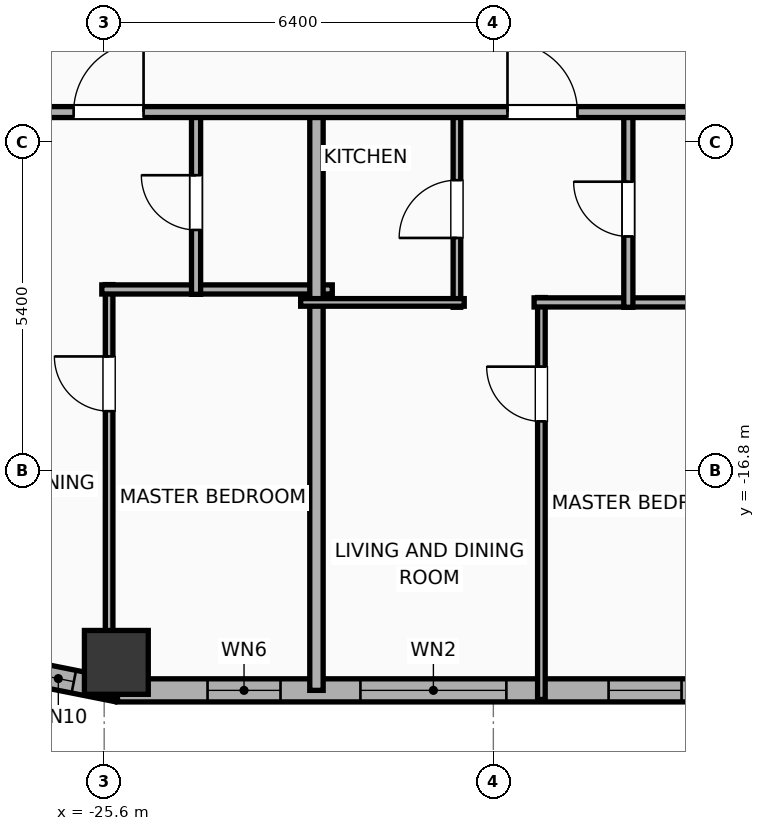
"""IFC4 building model, lengths in metres.
Left out: names, types, materials, properties, quantities, classifications, styles, units other than length and angle.
Written with IfcOpenShell. Run it as: python <this file> out.ifc"""

import sys

from ifc_helpers import new_model, si_unit, direction, frame, frame_2d, origin, origin_2d, place, context, subcontext, project, spatial, rectangle, hollow_rectangle, extrude, element, fill, save


model = new_model("IFC4")
c1 = context("Model", 3, precision=1e-05, world=origin(), true_north=direction((0.0, 1.0)))
c2 = subcontext(c1, "Body", "Model", "MODEL_VIEW")
j1 = project(units=[si_unit("LENGTHUNIT", "METRE"), si_unit("PLANEANGLEUNIT", "RADIAN")], contexts=[c1])
p1 = place(None, origin())
s1 = spatial("IfcSite", under=j1, at=p1, CompositionType="ELEMENT")
p2 = place(p1, origin())
s2 = spatial("IfcBuilding", under=s1, at=p2, CompositionType="ELEMENT")
p3 = place(p2, frame((0.0, 0.0, 89.7)))
s3 = spatial("IfcBuildingStorey", under=s2, at=p3, CompositionType="ELEMENT", Elevation=89.7)
p4 = place(p3, frame((-25.4, -19.95, 0.0), z_axis=(0.0, 0.0, 1.0), x_axis=(1.0, 0.0, 0.0)))
e1 = element("IfcColumn", 1, at=p4, inside=s3, PredefinedType="COLUMN", context=c2, shape_type="SweptSolid", body=[
    extrude(hollow_rectangle(XDim=1.05, YDim=1.05, WallThickness=0.036, at=origin_2d()), origin(), (0.0, 0.0, 1.0), 3.9),
])
p5 = place(p3, frame((29.381, -20.41, 0.0), z_axis=(0.0, 0.0, 1.0), x_axis=(-1.0, 0.0, 0.0)))
e2 = element("IfcWall", 2, at=p5, inside=s3, PredefinedType="ELEMENTEDWALL", context=c2, shape_type="SweptSolid", body=[
    extrude(rectangle(XDim=54.763, YDim=0.38, at=frame_2d((27.381, 0.0))), origin(), (0.0, 0.0, 1.0), 2.54),
])
p6 = place(p5, frame((48.367, 0.0, 0.75)))
e3 = element("IfcOpeningElement", 3, at=p6, cuts=e2, PredefinedType="OPENING", context=c2, shape_type="SweptSolid", body=[
    extrude(rectangle(XDim=2.4, YDim=1.63, at=frame_2d((1.2, 0.815))), frame((0.0, 0.2, 0.0), z_axis=(0.0, -1.0, 0.0), x_axis=(1.0, 0.0, 0.0)), (0.0, 0.0, 1.0), 0.4),
])
p7 = place(p5, frame((52.081, 0.0, 0.75)))
e4 = element("IfcOpeningElement", 4, at=p7, cuts=e2, PredefinedType="OPENING", context=c2, shape_type="SweptSolid", body=[
    extrude(rectangle(XDim=1.2, YDim=1.63, at=frame_2d((0.6, 0.815))), frame((0.0, 0.2, 0.0), z_axis=(0.0, -1.0, 0.0), x_axis=(1.0, 0.0, 0.0)), (0.0, 0.0, 1.0), 0.4),
])
p8 = place(p5, frame((45.486, 0.0, 0.75)))
e5 = element("IfcOpeningElement", 5, at=p8, cuts=e2, PredefinedType="OPENING", context=c2, shape_type="SweptSolid", body=[
    extrude(rectangle(XDim=1.2, YDim=1.63, at=frame_2d((0.6, 0.815))), frame((0.0, 0.2, 0.0), z_axis=(0.0, -1.0, 0.0), x_axis=(1.0, 0.0, 0.0)), (0.0, 0.0, 1.0), 0.4),
])
p9 = place(p5, frame((40.531, 0.0, 0.75)))
e6 = element("IfcOpeningElement", 6, at=p9, cuts=e2, PredefinedType="OPENING", context=c2, shape_type="SweptSolid", body=[
    extrude(rectangle(XDim=1.2, YDim=1.63, at=frame_2d((0.6, 0.815))), frame((0.0, 0.2, 0.0), z_axis=(0.0, -1.0, 0.0), x_axis=(1.0, 0.0, 0.0)), (0.0, 0.0, 1.0), 0.4),
])
p10 = place(p5, frame((33.686, 0.0, 0.75)))
e7 = element("IfcOpeningElement", 7, at=p10, cuts=e2, PredefinedType="OPENING", context=c2, shape_type="SweptSolid", body=[
    extrude(rectangle(XDim=1.2, YDim=1.63, at=frame_2d((0.6, 0.815))), frame((0.0, 0.2, 0.0), z_axis=(0.0, -1.0, 0.0), x_axis=(1.0, 0.0, 0.0)), (0.0, 0.0, 1.0), 0.4),
])
p11 = place(p5, frame((35.976, 0.0, 0.75)))
e8 = element("IfcOpeningElement", 8, at=p11, cuts=e2, PredefinedType="OPENING", context=c2, shape_type="SweptSolid", body=[
    extrude(rectangle(XDim=1.2, YDim=1.63, at=frame_2d((0.6, 0.815))), frame((0.0, 0.2, 0.0), z_axis=(0.0, -1.0, 0.0), x_axis=(1.0, 0.0, 0.0)), (0.0, 0.0, 1.0), 0.4),
])
p12 = place(p5, frame((28.805, 0.0, 0.75)))
e9 = element("IfcOpeningElement", 9, at=p12, cuts=e2, PredefinedType="OPENING", context=c2, shape_type="SweptSolid", body=[
    extrude(rectangle(XDim=1.2, YDim=1.63, at=frame_2d((0.6, 0.815))), frame((0.0, 0.2, 0.0), z_axis=(0.0, -1.0, 0.0), x_axis=(1.0, 0.0, 0.0)), (0.0, 0.0, 1.0), 0.4),
])
p13 = place(p5, frame((25.555, 0.0, 0.75)))
e10 = element("IfcOpeningElement", 10, at=p13, cuts=e2, PredefinedType="OPENING", context=c2, shape_type="SweptSolid", body=[
    extrude(rectangle(XDim=1.2, YDim=1.63, at=frame_2d((0.6, 0.815))), frame((0.0, 0.2, 0.0), z_axis=(0.0, -1.0, 0.0), x_axis=(1.0, 0.0, 0.0)), (0.0, 0.0, 1.0), 0.4),
])
p14 = place(p5, frame((19.951, 0.0, 0.75)))
e11 = element("IfcOpeningElement", 11, at=p14, cuts=e2, PredefinedType="OPENING", context=c2, shape_type="SweptSolid", body=[
    extrude(rectangle(XDim=1.2, YDim=1.63, at=frame_2d((0.6, 0.815))), frame((0.0, 0.2, 0.0), z_axis=(0.0, -1.0, 0.0), x_axis=(1.0, 0.0, 0.0)), (0.0, 0.0, 1.0), 0.4),
])
p15 = place(p5, frame((16.008, 0.0, 0.75)))
e12 = element("IfcOpeningElement", 12, at=p15, cuts=e2, PredefinedType="OPENING", context=c2, shape_type="SweptSolid", body=[
    extrude(rectangle(XDim=1.2, YDim=1.63, at=frame_2d((0.6, 0.815))), frame((0.0, 0.2, 0.0), z_axis=(0.0, -1.0, 0.0), x_axis=(1.0, 0.0, 0.0)), (0.0, 0.0, 1.0), 0.4),
])
p16 = place(p5, frame((13.008, 0.0, 0.75)))
e13 = element("IfcOpeningElement", 13, at=p16, cuts=e2, PredefinedType="OPENING", context=c2, shape_type="SweptSolid", body=[
    extrude(rectangle(XDim=1.2, YDim=1.63, at=frame_2d((0.6, 0.815))), frame((0.0, 0.2, 0.0), z_axis=(0.0, -1.0, 0.0), x_axis=(1.0, 0.0, 0.0)), (0.0, 0.0, 1.0), 0.4),
])
p17 = place(p5, frame((8.948, 0.0, 0.75)))
e14 = element("IfcOpeningElement", 14, at=p17, cuts=e2, PredefinedType="OPENING", context=c2, shape_type="SweptSolid", body=[
    extrude(rectangle(XDim=1.2, YDim=1.63, at=frame_2d((0.6, 0.815))), frame((0.0, 0.2, 0.0), z_axis=(0.0, -1.0, 0.0), x_axis=(1.0, 0.0, 0.0)), (0.0, 0.0, 1.0), 0.4),
])
p18 = place(p5, frame((6.908, 0.0, 0.75)))
e15 = element("IfcOpeningElement", 15, at=p18, cuts=e2, PredefinedType="OPENING", context=c2, shape_type="SweptSolid", body=[
    extrude(rectangle(XDim=1.2, YDim=1.63, at=frame_2d((0.6, 0.815))), frame((0.0, 0.2, 0.0), z_axis=(0.0, -1.0, 0.0), x_axis=(1.0, 0.0, 0.0)), (0.0, 0.0, 1.0), 0.4),
])
p19 = place(p5, frame((1.695, 0.0, 0.75)))
e16 = element("IfcOpeningElement", 16, at=p19, cuts=e2, PredefinedType="OPENING", context=c2, shape_type="SweptSolid", body=[
    extrude(rectangle(XDim=1.2, YDim=1.63, at=frame_2d((0.6, 0.815))), frame((0.0, 0.2, 0.0), z_axis=(0.0, -1.0, 0.0), x_axis=(1.0, 0.0, 0.0)), (0.0, 0.0, 1.0), 0.4),
])
p20 = place(p5, frame((4.441, 0.0, 0.75)))
e17 = element("IfcOpeningElement", 17, at=p20, cuts=e2, PredefinedType="OPENING", context=c2, shape_type="SweptSolid", body=[
    extrude(rectangle(XDim=1.2, YDim=1.63, at=frame_2d((0.6, 0.815))), frame((0.0, 0.2, 0.0), z_axis=(0.0, -1.0, 0.0), x_axis=(1.0, 0.0, 0.0)), (0.0, 0.0, 1.0), 0.4),
])
p21 = place(p3, frame((-25.381, -20.41, 0.0), z_axis=(0.0, 0.0, 1.0), x_axis=(-0.980786132421, 0.195086038585, 0.0)))
e18 = element("IfcWall", 18, at=p21, inside=s3, PredefinedType="ELEMENTEDWALL", context=c2, shape_type="SweptSolid", body=[
    extrude(rectangle(XDim=1.504, YDim=0.38, at=frame_2d((0.752, 0.0))), origin(), (0.0, 0.0, 1.0), 2.54),
])
p22 = place(p21, frame((0.732, 0.0, 0.75)))
e19 = element("IfcOpeningElement", 19, at=p22, cuts=e18, PredefinedType="OPENING", context=c2, shape_type="SweptSolid", body=[
    extrude(rectangle(XDim=0.52, YDim=1.63, at=frame_2d((0.26, 0.815))), frame((0.0, 0.2, 0.0), z_axis=(0.0, -1.0, 0.0), x_axis=(1.0, 0.0, 0.0)), (0.0, 0.0, 1.0), 0.4),
])
p23 = place(p3, frame((-25.519, -20.535, 0.0), z_axis=(0.0, 0.0, 1.0), x_axis=(0.0, 1.0, 0.0)))
e20 = element("IfcWall", 20, at=p23, inside=s3, PredefinedType="PARTITIONING", context=c2, shape_type="SweptSolid", body=[
    extrude(rectangle(XDim=6.798, YDim=0.125, at=frame_2d((3.399, 0.0))), origin(), (0.0, 0.0, 1.0), 3.65),
])
p24 = place(p23, frame((4.717, 0.0, 0.0)))
e21 = element("IfcOpeningElement", 21, at=p24, cuts=e20, PredefinedType="OPENING", context=c2, shape_type="SweptSolid", body=[
    extrude(rectangle(XDim=0.9, YDim=2.05, at=frame_2d((0.45, 1.025))), frame((0.0, 0.073, 0.0), z_axis=(0.0, -1.0, 0.0), x_axis=(1.0, 0.0, 0.0)), (0.0, 0.0, 1.0), 0.145),
])
p25 = place(p3, frame((-25.639, -13.817, 0.0), z_axis=(0.0, 0.0, 1.0), x_axis=(1.0, 0.0, 0.0)))
e22 = element("IfcWall", 22, at=p25, inside=s3, PredefinedType="PLUMBINGWALL", context=c2, shape_type="SweptSolid", body=[
    extrude(rectangle(XDim=3.79, YDim=0.15, at=frame_2d((1.895, 0.0))), origin(), (0.0, 0.0, 1.0), 3.65),
])
p26 = place(p3, frame((-24.089, -13.897, 0.0), z_axis=(0.0, 0.0, 1.0), x_axis=(0.0, 1.0, 0.0)))
e23 = element("IfcWall", 23, at=p26, inside=s3, PredefinedType="PLUMBINGWALL", context=c2, shape_type="SweptSolid", body=[
    extrude(rectangle(XDim=3.017, YDim=0.15, at=frame_2d((1.509, 0.0))), origin(), (0.0, 0.0, 1.0), 3.65),
])
p27 = place(p26, frame((1.059, 0.0, 0.0)))
e24 = element("IfcOpeningElement", 24, at=p27, cuts=e23, PredefinedType="OPENING", context=c2, shape_type="SweptSolid", body=[
    extrude(rectangle(XDim=0.9, YDim=2.05, at=frame_2d((0.45, 1.025))), frame((0.0, 0.085, 0.0), z_axis=(0.0, -1.0, 0.0), x_axis=(1.0, 0.0, 0.0)), (0.0, 0.0, 1.0), 0.17),
])
p28 = place(p3, frame((-22.109, -20.41, 0.0), z_axis=(0.0, 0.0, 1.0), x_axis=(0.0, 1.0, 0.0)))
e25 = element("IfcWall", 25, at=p28, inside=s3, PredefinedType="PARTITIONING", context=c2, shape_type="SweptSolid", body=[
    extrude(rectangle(XDim=9.59, YDim=0.22, at=frame_2d((4.795, 0.0))), origin(), (0.0, 0.0, 1.0), 3.65),
])
p29 = place(p3, frame((-18.41, -20.56, 0.0), z_axis=(0.0, 0.0, 1.0), x_axis=(0.0, 1.0, 0.0)))
e26 = element("IfcWall", 26, at=p29, inside=s3, PredefinedType="PARTITIONING", context=c2, shape_type="SweptSolid", body=[
    extrude(rectangle(XDim=6.61, YDim=0.125, at=frame_2d((3.305, 0.0))), origin(), (0.0, 0.0, 1.0), 3.65),
])
p30 = place(p29, frame((4.573, 0.0, 0.0)))
e27 = element("IfcOpeningElement", 27, at=p30, cuts=e26, PredefinedType="OPENING", context=c2, shape_type="SweptSolid", body=[
    extrude(rectangle(XDim=0.9, YDim=2.05, at=frame_2d((0.45, 1.025))), frame((0.0, 0.073, 0.0), z_axis=(0.0, -1.0, 0.0), x_axis=(1.0, 0.0, 0.0)), (0.0, 0.0, 1.0), 0.145),
])
p31 = place(p3, frame((-18.53, -14.03, 0.0), z_axis=(0.0, 0.0, 1.0), x_axis=(1.0, 0.0, 0.0)))
e28 = element("IfcWall", 28, at=p31, inside=s3, PredefinedType="PLUMBINGWALL", context=c2, shape_type="SweptSolid", body=[
    extrude(rectangle(XDim=3.79, YDim=0.15, at=frame_2d((1.895, 0.0))), origin(), (0.0, 0.0, 1.0), 3.65),
])
p32 = place(p3, frame((-19.799, -14.11, 0.0), z_axis=(0.0, 0.0, 1.0), x_axis=(0.0, 1.0, 0.0)))
e29 = element("IfcWall", 29, at=p32, inside=s3, PredefinedType="PARTITIONING", context=c2, shape_type="SweptSolid", body=[
    extrude(rectangle(XDim=3.23, YDim=0.125, at=frame_2d((1.615, 0.0))), origin(), (0.0, 0.0, 1.0), 3.65),
])
p33 = place(p32, frame((1.14, 0.0, 0.0)))
e30 = element("IfcOpeningElement", 30, at=p33, cuts=e29, PredefinedType="OPENING", context=c2, shape_type="SweptSolid", body=[
    extrude(rectangle(XDim=0.95, YDim=2.05, at=frame_2d((0.475, 1.025))), frame((0.0, 0.073, 0.0), z_axis=(0.0, -1.0, 0.0), x_axis=(1.0, 0.0, 0.0)), (0.0, 0.0, 1.0), 0.145),
])
p34 = place(p3, frame((-22.369, -14.03, 0.0), z_axis=(0.0, 0.0, 1.0), x_axis=(1.0, 0.0, 0.0)))
e31 = element("IfcWall", 31, at=p34, inside=s3, PredefinedType="PARTITIONING", context=c2, shape_type="SweptSolid", body=[
    extrude(rectangle(XDim=2.69, YDim=0.125, at=frame_2d((1.345, 0.0))), origin(), (0.0, 0.0, 1.0), 3.65),
])
p35 = place(p3, frame((-16.98, -14.11, 0.0), z_axis=(0.0, 0.0, 1.0), x_axis=(0.0, 1.0, 0.0)))
e32 = element("IfcWall", 32, at=p35, inside=s3, PredefinedType="PLUMBINGWALL", context=c2, shape_type="SweptSolid", body=[
    extrude(rectangle(XDim=3.23, YDim=0.15, at=frame_2d((1.615, 0.0))), origin(), (0.0, 0.0, 1.0), 3.65),
])
p36 = place(p35, frame((1.165, 0.0, 0.0)))
e33 = element("IfcOpeningElement", 33, at=p36, cuts=e32, PredefinedType="OPENING", context=c2, shape_type="SweptSolid", body=[
    extrude(rectangle(XDim=0.9, YDim=2.05, at=frame_2d((0.45, 1.025))), frame((0.0, 0.085, 0.0), z_axis=(0.0, -1.0, 0.0), x_axis=(1.0, 0.0, 0.0)), (0.0, 0.0, 1.0), 0.17),
])
p37 = place(p3, frame((-29.21, -10.9, 0.0), z_axis=(0.0, 0.0, 1.0), x_axis=(1.0, 0.0, 0.0)))
e34 = element("IfcWall", 34, at=p37, inside=s3, PredefinedType="PARTITIONING", context=c2, shape_type="SweptSolid", body=[
    extrude(rectangle(XDim=62.42, YDim=0.18, at=frame_2d((31.21, 0.0))), origin(), (0.0, 0.0, 1.0), 3.65),
])
p38 = place(p37, frame((3.108, 0.0, 0.0)))
e35 = element("IfcOpeningElement", 35, at=p38, cuts=e34, PredefinedType="OPENING", context=c2, shape_type="SweptSolid", body=[
    extrude(rectangle(XDim=1.15, YDim=2.05, at=frame_2d((0.575, 1.025))), frame((0.0, 0.1, 0.0), z_axis=(0.0, -1.0, 0.0), x_axis=(1.0, 0.0, 0.0)), (0.0, 0.0, 1.0), 0.2),
])
p39 = place(p37, frame((10.242, 0.0, 0.0)))
e36 = element("IfcOpeningElement", 36, at=p39, cuts=e34, PredefinedType="OPENING", context=c2, shape_type="SweptSolid", body=[
    extrude(rectangle(XDim=1.15, YDim=2.05, at=frame_2d((0.575, 1.025))), frame((0.0, 0.1, 0.0), z_axis=(0.0, -1.0, 0.0), x_axis=(1.0, 0.0, 0.0)), (0.0, 0.0, 1.0), 0.2),
])
p40 = place(p37, frame((17.14, 0.0, 0.0)))
e37 = element("IfcOpeningElement", 37, at=p40, cuts=e34, PredefinedType="OPENING", context=c2, shape_type="SweptSolid", body=[
    extrude(rectangle(XDim=0.9, YDim=2.05, at=frame_2d((0.45, 1.025))), frame((0.0, 0.1, 0.0), z_axis=(0.0, -1.0, 0.0), x_axis=(1.0, 0.0, 0.0)), (0.0, 0.0, 1.0), 0.2),
])
p41 = place(p37, frame((24.661, 0.0, 0.0)))
e38 = element("IfcOpeningElement", 38, at=p41, cuts=e34, PredefinedType="OPENING", context=c2, shape_type="SweptSolid", body=[
    extrude(rectangle(XDim=1.15, YDim=2.05, at=frame_2d((0.575, 1.025))), frame((0.0, 0.1, 0.0), z_axis=(0.0, -1.0, 0.0), x_axis=(1.0, 0.0, 0.0)), (0.0, 0.0, 1.0), 0.2),
])
p42 = place(p37, frame((28.644, 0.0, 0.0)))
e39 = element("IfcOpeningElement", 39, at=p42, cuts=e34, PredefinedType="OPENING", context=c2, shape_type="SweptSolid", body=[
    extrude(rectangle(XDim=1.15, YDim=2.05, at=frame_2d((0.575, 1.025))), frame((0.0, 0.1, 0.0), z_axis=(0.0, -1.0, 0.0), x_axis=(1.0, 0.0, 0.0)), (0.0, 0.0, 1.0), 0.2),
])
p43 = place(p37, frame((36.64, 0.0, 0.0)))
e40 = element("IfcOpeningElement", 40, at=p43, cuts=e34, PredefinedType="OPENING", context=c2, shape_type="SweptSolid", body=[
    extrude(rectangle(XDim=0.9, YDim=2.05, at=frame_2d((0.45, 1.025))), frame((0.0, 0.1, 0.0), z_axis=(0.0, -1.0, 0.0), x_axis=(1.0, 0.0, 0.0)), (0.0, 0.0, 1.0), 0.2),
])
p44 = place(p37, frame((41.44, 0.0, 0.0)))
e41 = element("IfcOpeningElement", 41, at=p44, cuts=e34, PredefinedType="OPENING", context=c2, shape_type="SweptSolid", body=[
    extrude(rectangle(XDim=1.15, YDim=2.05, at=frame_2d((0.575, 1.025))), frame((0.0, 0.1, 0.0), z_axis=(0.0, -1.0, 0.0), x_axis=(1.0, 0.0, 0.0)), (0.0, 0.0, 1.0), 0.2),
])
p45 = place(p37, frame((47.538, 0.0, 0.0)))
e42 = element("IfcOpeningElement", 42, at=p45, cuts=e34, PredefinedType="OPENING", context=c2, shape_type="SweptSolid", body=[
    extrude(rectangle(XDim=1.15, YDim=2.05, at=frame_2d((0.575, 1.025))), frame((0.0, 0.1, 0.0), z_axis=(0.0, -1.0, 0.0), x_axis=(1.0, 0.0, 0.0)), (0.0, 0.0, 1.0), 0.2),
])
p46 = place(p37, frame((57.157, 0.0, 0.0)))
e43 = element("IfcOpeningElement", 43, at=p46, cuts=e34, PredefinedType="OPENING", context=c2, shape_type="SweptSolid", body=[
    extrude(rectangle(XDim=1.15, YDim=2.05, at=frame_2d((0.575, 1.025))), frame((0.0, 0.1, 0.0), z_axis=(0.0, -1.0, 0.0), x_axis=(1.0, 0.0, 0.0)), (0.0, 0.0, 1.0), 0.2),
])
p47 = place(p6, origin())
e44 = element("IfcWindow", 44, at=p47, inside=s3, PartitioningType="SINGLE_PANEL", PredefinedType="WINDOW", context=c2, shape_type="SweptSolid", body=[
    extrude(rectangle(XDim=2.4, YDim=1.63, at=frame_2d((1.2, 0.815))), frame((0.0, 0.03, 0.0), z_axis=(0.0, -1.0, 0.0), x_axis=(1.0, 0.0, 0.0)), (0.0, 0.0, 1.0), 0.06),
])
fill(e3, e44)
p48 = place(p22, origin())
e45 = element("IfcWindow", 45, at=p48, inside=s3, PartitioningType="SINGLE_PANEL", PredefinedType="WINDOW", context=c2, shape_type="SweptSolid", body=[
    extrude(rectangle(XDim=0.52, YDim=1.63, at=frame_2d((0.26, 0.815))), frame((0.0, 0.03, 0.0), z_axis=(0.0, -1.0, 0.0), x_axis=(1.0, 0.0, 0.0)), (0.0, 0.0, 1.0), 0.06),
])
fill(e19, e45)
p49 = place(p7, origin())
e46 = element("IfcWindow", 46, at=p49, inside=s3, PartitioningType="SINGLE_PANEL", PredefinedType="WINDOW", context=c2, shape_type="SweptSolid", body=[
    extrude(rectangle(XDim=1.2, YDim=1.63, at=frame_2d((0.6, 0.815))), frame((0.0, 0.03, 0.0), z_axis=(0.0, -1.0, 0.0), x_axis=(1.0, 0.0, 0.0)), (0.0, 0.0, 1.0), 0.06),
])
fill(e4, e46)
p50 = place(p8, origin())
e47 = element("IfcWindow", 47, at=p50, inside=s3, PartitioningType="SINGLE_PANEL", PredefinedType="WINDOW", context=c2, shape_type="SweptSolid", body=[
    extrude(rectangle(XDim=1.2, YDim=1.63, at=frame_2d((0.6, 0.815))), frame((0.0, 0.03, 0.0), z_axis=(0.0, -1.0, 0.0), x_axis=(1.0, 0.0, 0.0)), (0.0, 0.0, 1.0), 0.06),
])
fill(e5, e47)
p51 = place(p24, origin())
e48 = element("IfcDoor", 48, at=p51, inside=s3, OperationType="SINGLE_SWING_RIGHT", PredefinedType="DOOR", context=c2, shape_type="SweptSolid", body=[
    extrude(rectangle(XDim=0.9, YDim=2.05, at=frame_2d((0.45, 1.025))), frame((0.0, 0.025, 0.0), z_axis=(0.0, -1.0, 0.0), x_axis=(1.0, 0.0, 0.0)), (0.0, 0.0, 1.0), 0.05),
])
fill(e21, e48)
p52 = place(p27, origin())
e49 = element("IfcDoor", 49, at=p52, inside=s3, OperationType="SINGLE_SWING_RIGHT", PredefinedType="DOOR", context=c2, shape_type="SweptSolid", body=[
    extrude(rectangle(XDim=0.9, YDim=2.05, at=frame_2d((0.45, 1.025))), frame((0.0, 0.025, 0.0), z_axis=(0.0, -1.0, 0.0), x_axis=(1.0, 0.0, 0.0)), (0.0, 0.0, 1.0), 0.05),
])
fill(e24, e49)
p53 = place(p30, origin())
e50 = element("IfcDoor", 50, at=p53, inside=s3, OperationType="SINGLE_SWING_RIGHT", PredefinedType="DOOR", context=c2, shape_type="SweptSolid", body=[
    extrude(rectangle(XDim=0.9, YDim=2.05, at=frame_2d((0.45, 1.025))), frame((0.0, 0.025, 0.0), z_axis=(0.0, -1.0, 0.0), x_axis=(1.0, 0.0, 0.0)), (0.0, 0.0, 1.0), 0.05),
])
fill(e27, e50)
p54 = place(p33, origin())
e51 = element("IfcDoor", 51, at=p54, inside=s3, OperationType="SINGLE_SWING_LEFT", PredefinedType="DOOR", context=c2, shape_type="SweptSolid", body=[
    extrude(rectangle(XDim=0.95, YDim=2.05, at=frame_2d((0.475, 1.025))), frame((0.0, 0.025, 0.0), z_axis=(0.0, -1.0, 0.0), x_axis=(1.0, 0.0, 0.0)), (0.0, 0.0, 1.0), 0.05),
])
fill(e30, e51)
p55 = place(p36, origin())
e52 = element("IfcDoor", 52, at=p55, inside=s3, OperationType="SINGLE_SWING_RIGHT", PredefinedType="DOOR", context=c2, shape_type="SweptSolid", body=[
    extrude(rectangle(XDim=0.9, YDim=2.05, at=frame_2d((0.45, 1.025))), frame((0.0, 0.025, 0.0), z_axis=(0.0, -1.0, 0.0), x_axis=(1.0, 0.0, 0.0)), (0.0, 0.0, 1.0), 0.05),
])
fill(e33, e52)
p56 = place(p38, origin())
e53 = element("IfcDoor", 53, at=p56, inside=s3, OperationType="SINGLE_SWING_RIGHT", PredefinedType="DOOR", context=c2, shape_type="SweptSolid", body=[
    extrude(rectangle(XDim=1.15, YDim=2.05, at=frame_2d((0.575, 1.025))), frame((0.0, 0.025, 0.0), z_axis=(0.0, -1.0, 0.0), x_axis=(1.0, 0.0, 0.0)), (0.0, 0.0, 1.0), 0.05),
])
fill(e35, e53)
p57 = place(p39, origin())
e54 = element("IfcDoor", 54, at=p57, inside=s3, OperationType="SINGLE_SWING_LEFT", PredefinedType="DOOR", context=c2, shape_type="SweptSolid", body=[
    extrude(rectangle(XDim=1.15, YDim=2.05, at=frame_2d((0.575, 1.025))), frame((0.0, 0.025, 0.0), z_axis=(0.0, -1.0, 0.0), x_axis=(1.0, 0.0, 0.0)), (0.0, 0.0, 1.0), 0.05),
])
fill(e36, e54)
save(model, sys.argv[1])
